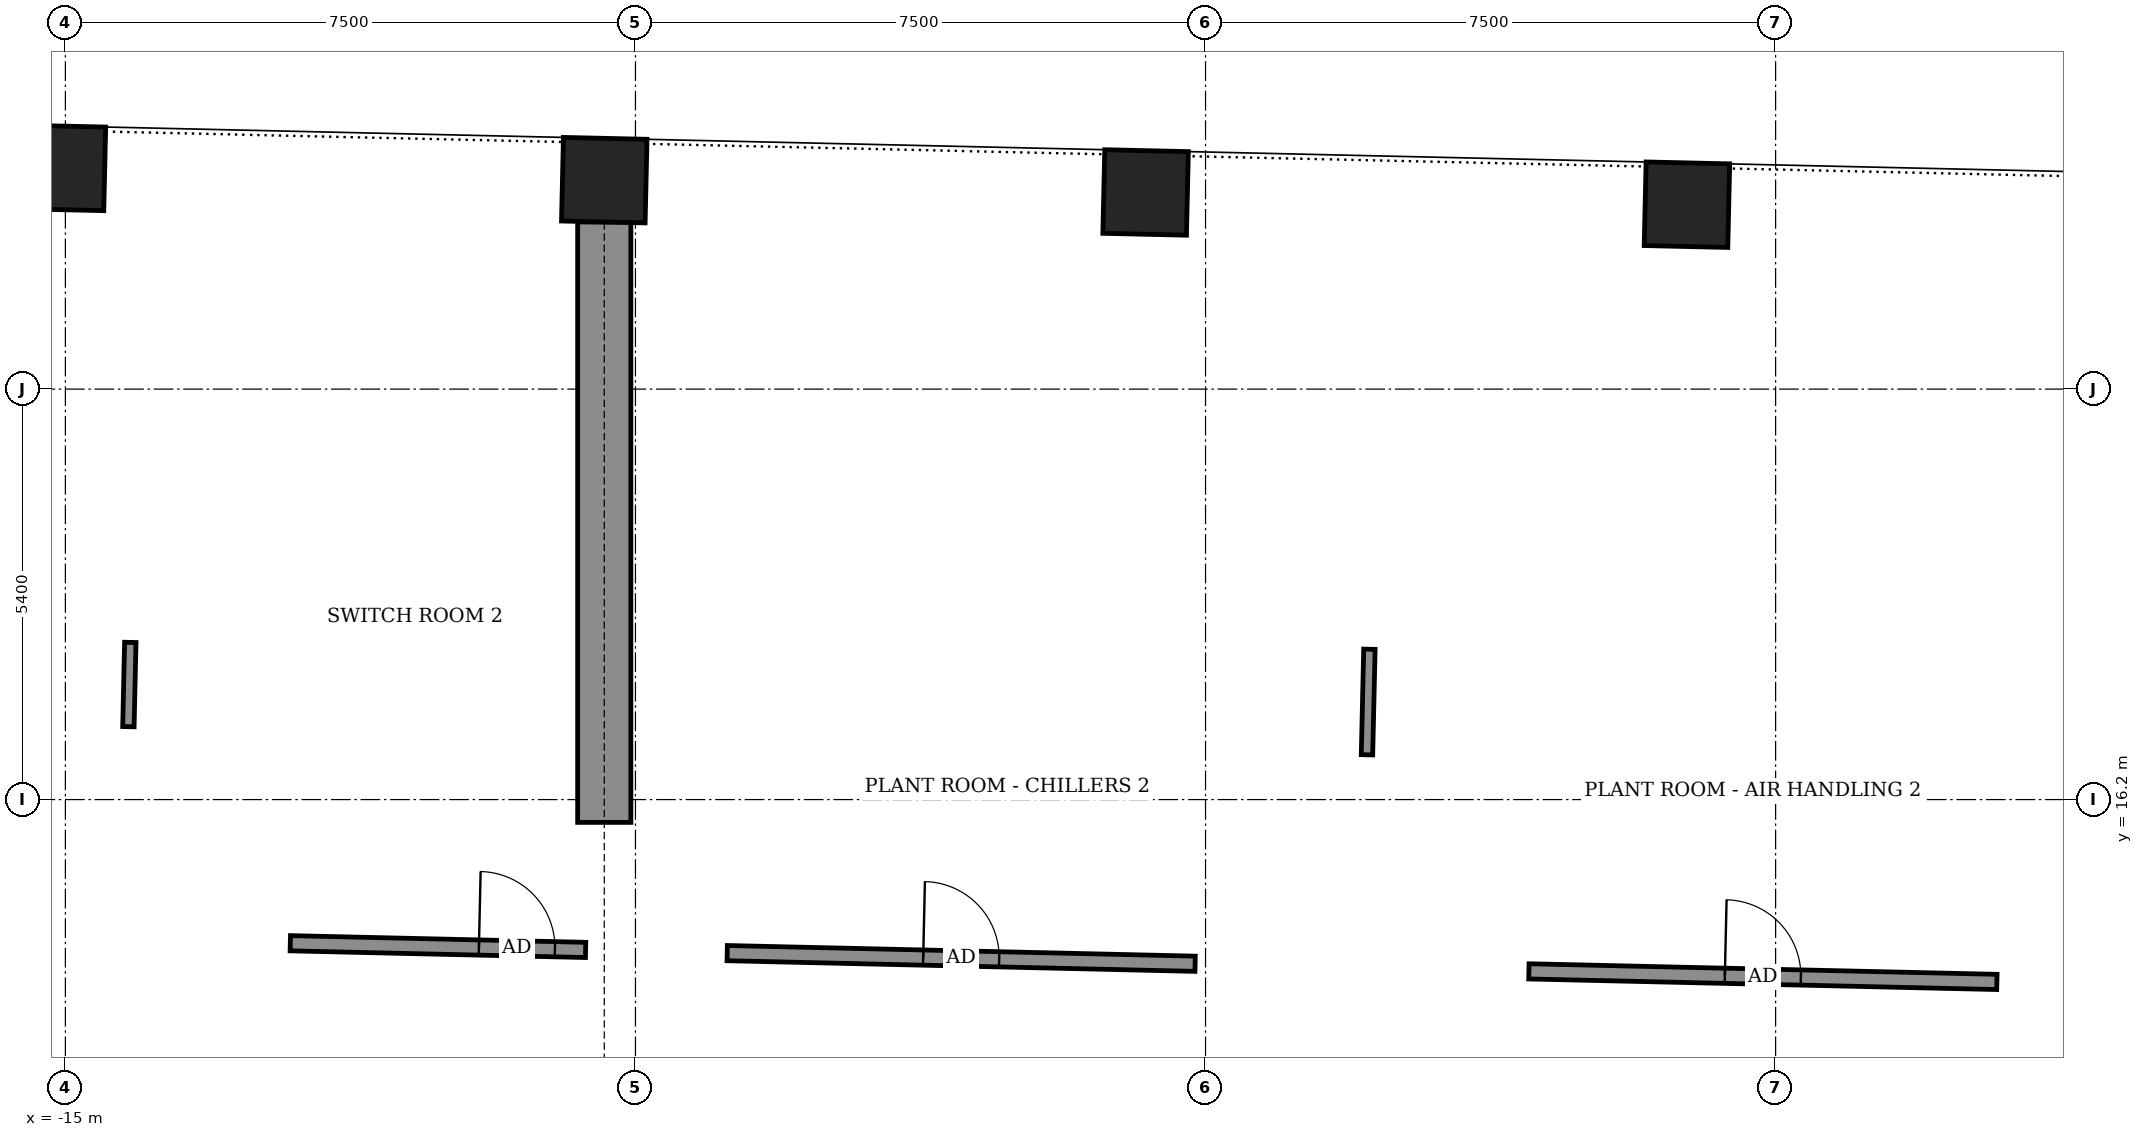
"""IFC4 building model, lengths in metres.
Left out: names, types, materials, properties, quantities, classifications, styles, units other than length and angle.
Written with IfcOpenShell. Run it as: python <this file> out.ifc"""

import sys

from ifc_helpers import new_model, si_unit, direction, frame, frame_2d, origin, origin_2d, place, context, subcontext, project, spatial, rectangle, extrude, element, fill, save


model = new_model("IFC4")
c1 = context("Model", 3, precision=1e-05, world=origin(), true_north=direction((0.0, 1.0)))
c2 = subcontext(c1, "Body", "Model", "MODEL_VIEW")
j1 = project(units=[si_unit("LENGTHUNIT", "METRE"), si_unit("PLANEANGLEUNIT", "RADIAN")], contexts=[c1])
p1 = place(None, origin())
s1 = spatial("IfcSite", under=j1, at=p1, CompositionType="ELEMENT")
p2 = place(p1, origin())
s2 = spatial("IfcBuilding", under=s1, at=p2, CompositionType="ELEMENT")
p3 = place(p2, frame((0.0, 0.0, 219.5)))
s3 = spatial("IfcBuildingStorey", under=s2, at=p3, CompositionType="ELEMENT", Elevation=219.5)
for number, where, z_axis, x_axis in (
    (1, (6.333, 24.026, -0.55), (0.0, 0.0, 1.0), (-1.0, 0.023, 0.0)),
    (2, (-0.789, 24.187, -0.55), (0.0, 0.0, 1.0), (-1.0, 0.023, 0.0)),
    (3, (-7.91, 24.349, -0.55), (0.0, 0.0, 1.0), (-1.0, 0.023, 0.0)),
    (4, (-15.032, 24.51, -0.55), (0.0, 0.0, 1.0), (-1.0, 0.023, 0.0)),
):
    element("IfcColumn", number, at=place(p3, frame(where, z_axis=z_axis, x_axis=x_axis)), inside=s3, PredefinedType="COLUMN", context=c2, shape_type="SweptSolid", body=[
        extrude(rectangle(XDim=1.1, YDim=1.1, at=origin_2d()), origin(), (0.0, 0.0, 1.0), 7.0),
    ])
p4 = place(p3, frame((-7.91, 15.9, 0.0), z_axis=(0.0, 0.0, 1.0), x_axis=(0.0, 1.0, 0.0)))
e5 = element("IfcWall", 5, at=p4, inside=s3, PredefinedType="SHEAR", context=c2, shape_type="SweptSolid", body=[
    extrude(rectangle(XDim=7.899, YDim=0.7, at=frame_2d((3.95, 0.0))), origin(), (0.0, 0.0, 1.0), 3.0),
])
p5 = place(p3, frame((-12.041, 14.31, 0.0), z_axis=(0.0, 0.0, 1.0), x_axis=(0.999742775287, -0.022680018971, 0.0)))
e6 = element("IfcWall", 6, at=p5, inside=s3, PredefinedType="PARTITIONING", context=c2, shape_type="SweptSolid", body=[
    extrude(rectangle(XDim=3.886, YDim=0.2, at=frame_2d((1.943, 0.0))), origin(), (0.0, 0.0, 1.0), 3.0),
])
p6 = place(p5, frame((2.482, 0.0, 0.0)))
e7 = element("IfcOpeningElement", 7, at=p6, cuts=e6, PredefinedType="OPENING", context=c2, shape_type="SweptSolid", body=[
    extrude(rectangle(XDim=1.0, YDim=2.1, at=frame_2d((0.5, 1.05))), frame((0.0, 0.11, 0.0), z_axis=(0.0, -1.0, 0.0), x_axis=(1.0, 0.0, 0.0)), (0.0, 0.0, 1.0), 0.22),
])
p7 = place(p3, frame((-6.293, 14.18, 0.0), z_axis=(0.0, 0.0, 1.0), x_axis=(0.999741896949, -0.022718703429, 0.0)))
e8 = element("IfcWall", 8, at=p7, inside=s3, PredefinedType="PARTITIONING", context=c2, shape_type="SweptSolid", body=[
    extrude(rectangle(XDim=6.158, YDim=0.2, at=frame_2d((3.079, 0.0))), origin(), (0.0, 0.0, 1.0), 6.45),
])
p8 = place(p7, frame((2.579, 0.0, 0.0)))
e9 = element("IfcOpeningElement", 9, at=p8, cuts=e8, PredefinedType="OPENING", context=c2, shape_type="SweptSolid", body=[
    extrude(rectangle(XDim=1.0, YDim=2.1, at=frame_2d((0.5, 1.05))), frame((0.0, 0.11, 0.0), z_axis=(0.0, -1.0, 0.0), x_axis=(1.0, 0.0, 0.0)), (0.0, 0.0, 1.0), 0.22),
])
p9 = place(p3, frame((4.254, 13.94, 0.0), z_axis=(0.0, 0.0, 1.0), x_axis=(0.999745567233, -0.022556613179, 0.0)))
e10 = element("IfcWall", 10, at=p9, inside=s3, PredefinedType="PARTITIONING", context=c2, shape_type="SweptSolid", body=[
    extrude(rectangle(XDim=6.158, YDim=0.2, at=frame_2d((3.079, 0.0))), origin(), (0.0, 0.0, 1.0), 6.45),
])
p10 = place(p9, frame((2.579, 0.0, 0.0)))
e11 = element("IfcOpeningElement", 11, at=p10, cuts=e10, PredefinedType="OPENING", context=c2, shape_type="SweptSolid", body=[
    extrude(rectangle(XDim=1.0, YDim=2.1, at=frame_2d((0.5, 1.05))), frame((0.0, 0.11, 0.0), z_axis=(0.0, -1.0, 0.0), x_axis=(1.0, 0.0, 0.0)), (0.0, 0.0, 1.0), 0.22),
])
p11 = place(p3, frame((-14.171, 17.159, 0.0), z_axis=(0.0, 0.0, 1.0), x_axis=(0.022446467252, 0.999748046314, 0.0)))
e12 = element("IfcWall", 12, at=p11, inside=s3, PredefinedType="PARTITIONING", context=c2, shape_type="SweptSolid", body=[
    extrude(rectangle(XDim=1.109, YDim=0.15, at=frame_2d((0.555, 0.0))), origin(), (0.0, 0.0, 1.0), 6.45),
])
p12 = place(p3, frame((2.124, 16.789, 0.0), z_axis=(0.0, 0.0, 1.0), x_axis=(0.023020791567, 0.999734986462, 0.0)))
e13 = element("IfcWall", 13, at=p12, inside=s3, PredefinedType="PARTITIONING", context=c2, shape_type="SweptSolid", body=[
    extrude(rectangle(XDim=1.389, YDim=0.15, at=frame_2d((0.695, 0.0))), origin(), (0.0, 0.0, 1.0), 6.45),
])
p13 = place(p10, origin())
e14 = element("IfcDoor", 14, at=p13, inside=s3, OperationType="SINGLE_SWING_LEFT", PredefinedType="DOOR", context=c2, shape_type="SweptSolid", body=[
    extrude(rectangle(XDim=1.0, YDim=2.1, at=frame_2d((0.5, 1.05))), frame((0.0, 0.025, 0.0), z_axis=(0.0, -1.0, 0.0), x_axis=(1.0, 0.0, 0.0)), (0.0, 0.0, 1.0), 0.05),
])
fill(e11, e14)
p14 = place(p8, origin())
e15 = element("IfcDoor", 15, at=p14, inside=s3, OperationType="SINGLE_SWING_RIGHT", PredefinedType="DOOR", context=c2, shape_type="SweptSolid", body=[
    extrude(rectangle(XDim=1.0, YDim=2.1, at=frame_2d((0.5, 1.05))), frame((0.0, 0.025, 0.0), z_axis=(0.0, -1.0, 0.0), x_axis=(1.0, 0.0, 0.0)), (0.0, 0.0, 1.0), 0.05),
])
fill(e9, e15)
p15 = place(p6, origin())
e16 = element("IfcDoor", 16, at=p15, inside=s3, OperationType="SINGLE_SWING_LEFT", PredefinedType="DOOR", context=c2, shape_type="SweptSolid", body=[
    extrude(rectangle(XDim=1.0, YDim=2.1, at=frame_2d((0.5, 1.05))), frame((0.0, 0.025, 0.0), z_axis=(0.0, -1.0, 0.0), x_axis=(1.0, 0.0, 0.0)), (0.0, 0.0, 1.0), 0.05),
])
fill(e7, e16)
save(model, sys.argv[1])
